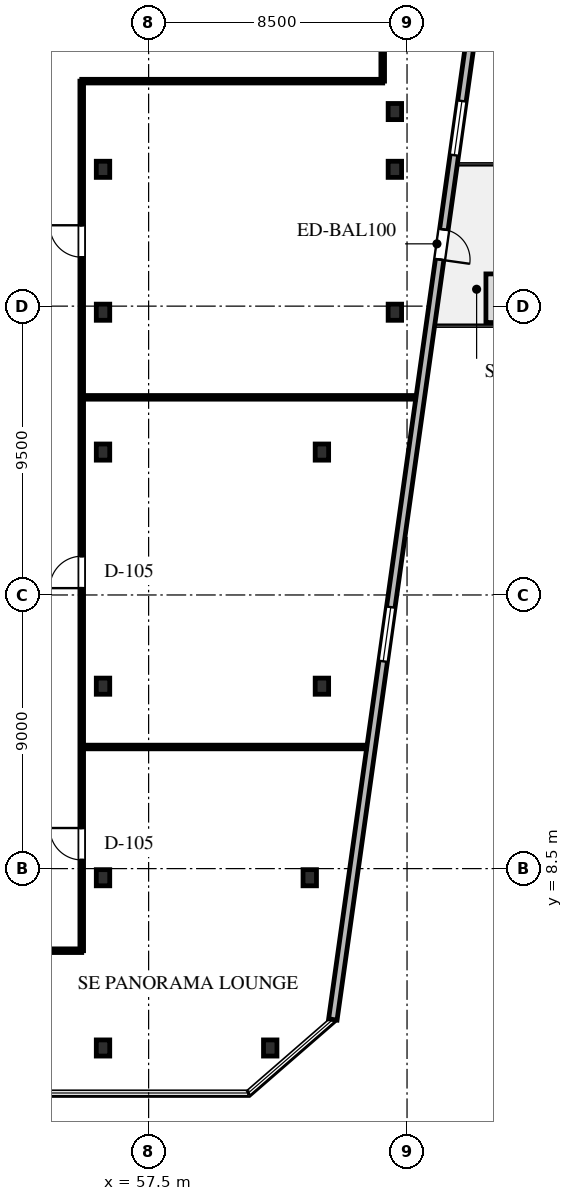
"""IFC4 building model, lengths in metres.
Left out: names, types, materials, properties, quantities, classifications, styles, units other than length and angle.
Written with IfcOpenShell. Run it as: python <this file> out.ifc"""

import sys

from ifc_helpers import new_model, si_unit, direction, frame, frame_2d, origin, origin_2d, place, context, subcontext, project, spatial, rectangle, i_section, extrude, element, fill, save


model = new_model("IFC4")
c1 = context("Model", 3, precision=1e-05, world=origin(), true_north=direction((0.0, 1.0)))
c2 = subcontext(c1, "Body", "Model", "MODEL_VIEW")
j1 = project(units=[si_unit("LENGTHUNIT", "METRE"), si_unit("PLANEANGLEUNIT", "RADIAN")], contexts=[c1])
p1 = place(None, origin())
s1 = spatial("IfcSite", under=j1, at=p1, CompositionType="ELEMENT")
p2 = place(p1, origin())
s2 = spatial("IfcBuilding", under=s1, at=p2, CompositionType="ELEMENT")
p3 = place(p2, frame((0.0, 0.0, 45.5)))
s3 = spatial("IfcBuildingStorey", under=s2, at=p3, CompositionType="ELEMENT", Elevation=45.5)
for number, where, z_axis, x_axis in (
    (1, (56.0, 14.5, 0.0), (0.0, 0.0, 1.0), (1.0, 0.0, 0.0)),
    (2, (63.2, 14.5, 0.0), (0.0, 0.0, 1.0), (1.0, 0.0, 0.0)),
    (3, (56.0, 22.2, 0.0), (0.0, 0.0, 1.0), (1.0, 0.0, 0.0)),
    (4, (63.2, 22.2, 0.0), (0.0, 0.0, 1.0), (1.0, 0.0, 0.0)),
    (5, (56.0, 26.8, 0.0), (0.0, 0.0, 1.0), (1.0, 0.0, 0.0)),
    (6, (65.6, 26.8, 0.0), (0.0, 0.0, 1.0), (1.0, 0.0, 0.0)),
    (7, (56.0, 31.5, 0.0), (0.0, 0.0, 1.0), (1.0, 0.0, 0.0)),
    (8, (65.6, 31.5, 0.0), (0.0, 0.0, 1.0), (1.0, 0.0, 0.0)),
    (9, (56.0, 2.6, 0.0), (0.0, 0.0, 1.0), (1.0, 0.0, 0.0)),
    (10, (61.5, 2.6, 0.0), (0.0, 0.0, 1.0), (1.0, 0.0, 0.0)),
    (11, (56.0, 8.2, 0.0), (0.0, 0.0, 1.0), (1.0, 0.0, 0.0)),
    (12, (62.8, 8.2, 0.0), (0.0, 0.0, 1.0), (1.0, 0.0, 0.0)),
    (13, (65.6, 33.4, 0.0), (0.0, 0.0, 1.0), (1.0, 0.0, 0.0)),
):
    element("IfcColumn", number, at=place(p3, frame(where, z_axis=z_axis, x_axis=x_axis)), inside=s3, PredefinedType="COLUMN", context=c2, shape_type="SweptSolid", body=[
        extrude(i_section(OverallWidth=0.442, OverallDepth=0.531, WebThickness=0.066, FlangeThickness=0.106, FilletRadius=0.03, at=origin_2d()), origin(), (0.0, 0.0, 1.0), 4.0),
    ])
p4 = place(p3, frame((68.375, 37.8, 0.0), z_axis=(0.0, 0.0, 1.0), x_axis=(-0.139174610616, -0.990267856572, 0.0)))
e14 = element("IfcWall", 14, at=p4, inside=s3, PredefinedType="STANDARD", context=c2, shape_type="SweptSolid", body=[
    extrude(rectangle(XDim=34.6, YDim=0.28, at=frame_2d((17.3, 0.0))), origin(), (0.0, 0.0, 1.0), 3.74),
])
p5 = place(p4, frame((8.36, 0.0, 0.0)))
e15 = element("IfcOpeningElement", 15, at=p5, cuts=e14, PredefinedType="OPENING", context=c2, shape_type="SweptSolid", body=[
    extrude(rectangle(XDim=1.0, YDim=2.15, at=frame_2d((0.5, 1.075))), frame((0.0, 0.15, 0.0), z_axis=(0.0, -1.0, 0.0), x_axis=(1.0, 0.0, 0.0)), (0.0, 0.0, 1.0), 0.3),
])
p6 = place(p4, frame((4.092, 0.0, 0.65)))
e16 = element("IfcOpeningElement", 16, at=p6, cuts=e14, PredefinedType="OPENING", context=c2, shape_type="SweptSolid", body=[
    extrude(rectangle(XDim=1.8, YDim=2.1, at=frame_2d((0.9, 1.05))), frame((0.0, 0.15, 0.0), z_axis=(0.0, -1.0, 0.0), x_axis=(1.0, 0.0, 0.0)), (0.0, 0.0, 1.0), 0.3),
])
p7 = place(p4, frame((20.903, 0.0, 0.65)))
e17 = element("IfcOpeningElement", 17, at=p7, cuts=e14, PredefinedType="OPENING", context=c2, shape_type="SweptSolid", body=[
    extrude(rectangle(XDim=1.8, YDim=2.1, at=frame_2d((0.9, 1.05))), frame((0.0, 0.15, 0.0), z_axis=(0.0, -1.0, 0.0), x_axis=(1.0, 0.0, 0.0)), (0.0, 0.0, 1.0), 0.3),
])
p8 = place(p3, frame((55.3, 34.4, 0.0), z_axis=(0.0, 0.0, 1.0), x_axis=(1.0, 0.0, 0.0)))
e18 = element("IfcWall", 18, at=p8, inside=s3, PredefinedType="PARTITIONING", context=c2, shape_type="SweptSolid", body=[
    extrude(rectangle(XDim=9.9, YDim=0.12, at=frame_2d((4.95, 0.0))), origin(), (0.0, 0.0, 1.0), 2.813),
])
p9 = place(p3, frame((65.2, 34.4, 0.0), z_axis=(0.0, 0.0, 1.0), x_axis=(0.0, 1.0, 0.0)))
e19 = element("IfcWall", 19, at=p9, inside=s3, PredefinedType="PARTITIONING", context=c2, shape_type="SweptSolid", body=[
    extrude(rectangle(XDim=3.217, YDim=0.12, at=frame_2d((1.608, 0.0))), origin(), (0.0, 0.0, 1.0), 2.813),
])
p10 = place(p3, frame((55.3, 5.8, 0.0), z_axis=(0.0, 0.0, 1.0), x_axis=(0.0, 1.0, 0.0)))
e20 = element("IfcWall", 20, at=p10, inside=s3, PredefinedType="PARTITIONING", context=c2, shape_type="SweptSolid", body=[
    extrude(rectangle(XDim=28.6, YDim=0.12, at=frame_2d((14.3, 0.0))), origin(), (0.0, 0.0, 1.0), 2.813),
])
p11 = place(p10, frame((2.985, 0.0, 0.0)))
e21 = element("IfcOpeningElement", 21, at=p11, cuts=e20, PredefinedType="OPENING", context=c2, shape_type="SweptSolid", body=[
    extrude(rectangle(XDim=1.05, YDim=2.2, at=frame_2d((0.525, 1.1))), frame((0.0, 0.07, 0.0), z_axis=(0.0, -1.0, 0.0), x_axis=(1.0, 0.0, 0.0)), (0.0, 0.0, 1.0), 0.14),
])
p12 = place(p10, frame((11.925, 0.0, 0.0)))
e22 = element("IfcOpeningElement", 22, at=p12, cuts=e20, PredefinedType="OPENING", context=c2, shape_type="SweptSolid", body=[
    extrude(rectangle(XDim=1.05, YDim=2.2, at=frame_2d((0.525, 1.1))), frame((0.0, 0.07, 0.0), z_axis=(0.0, -1.0, 0.0), x_axis=(1.0, 0.0, 0.0)), (0.0, 0.0, 1.0), 0.14),
])
p13 = place(p10, frame((22.81, 0.0, 0.0)))
e23 = element("IfcOpeningElement", 23, at=p13, cuts=e20, PredefinedType="OPENING", context=c2, shape_type="SweptSolid", body=[
    extrude(rectangle(XDim=1.05, YDim=2.2, at=frame_2d((0.525, 1.1))), frame((0.0, 0.07, 0.0), z_axis=(0.0, -1.0, 0.0), x_axis=(1.0, 0.0, 0.0)), (0.0, 0.0, 1.0), 0.14),
])
p14 = place(p3, frame((53.3, 5.8, 0.0), z_axis=(0.0, 0.0, 1.0), x_axis=(1.0, 0.0, 0.0)))
e24 = element("IfcWall", 24, at=p14, inside=s3, PredefinedType="PARTITIONING", context=c2, shape_type="SweptSolid", body=[
    extrude(rectangle(XDim=2.0, YDim=0.12, at=frame_2d((1.0, 0.0))), origin(), (0.0, 0.0, 1.0), 2.978),
])
p15 = place(p3, frame((55.368, 12.5, 0.0), z_axis=(0.0, 0.0, 1.0), x_axis=(1.0, 0.0, 0.0)))
e25 = element("IfcWall", 25, at=p15, inside=s3, PredefinedType="PARTITIONING", context=c2, shape_type="SweptSolid", body=[
    extrude(rectangle(XDim=9.285, YDim=0.12, at=frame_2d((4.642, 0.0))), origin(), (0.0, 0.0, 1.0), 2.813),
])
p16 = place(p3, frame((55.368, 24.0, 0.0), z_axis=(0.0, 0.0, 1.0), x_axis=(1.0, 0.0, 0.0)))
e26 = element("IfcWall", 26, at=p16, inside=s3, PredefinedType="PARTITIONING", context=c2, shape_type="SweptSolid", body=[
    extrude(rectangle(XDim=10.901, YDim=0.12, at=frame_2d((5.451, 0.0))), origin(), (0.0, 0.0, 1.0), 2.813),
])
p17 = place(p5, origin())
e27 = element("IfcDoor", 27, at=p17, inside=s3, OperationType="SINGLE_SWING_RIGHT", PredefinedType="DOOR", context=c2, shape_type="SweptSolid", body=[
    extrude(rectangle(XDim=1.0, YDim=2.15, at=frame_2d((0.5, 1.075))), frame((0.0, 0.025, 0.0), z_axis=(0.0, -1.0, 0.0), x_axis=(1.0, 0.0, 0.0)), (0.0, 0.0, 1.0), 0.05),
])
fill(e15, e27)
p18 = place(p6, origin())
e28 = element("IfcWindow", 28, at=p18, inside=s3, PartitioningType="SINGLE_PANEL", PredefinedType="WINDOW", context=c2, shape_type="SweptSolid", body=[
    extrude(rectangle(XDim=1.8, YDim=2.1, at=frame_2d((0.9, 1.05))), frame((0.0, 0.03, 0.0), z_axis=(0.0, -1.0, 0.0), x_axis=(1.0, 0.0, 0.0)), (0.0, 0.0, 1.0), 0.06),
])
fill(e16, e28)
p19 = place(p7, origin())
e29 = element("IfcWindow", 29, at=p19, inside=s3, PartitioningType="SINGLE_PANEL", PredefinedType="WINDOW", context=c2, shape_type="SweptSolid", body=[
    extrude(rectangle(XDim=1.8, YDim=2.1, at=frame_2d((0.9, 1.05))), frame((0.0, 0.03, 0.0), z_axis=(0.0, -1.0, 0.0), x_axis=(1.0, 0.0, 0.0)), (0.0, 0.0, 1.0), 0.06),
])
fill(e17, e29)
p20 = place(p11, origin())
e30 = element("IfcDoor", 30, at=p20, inside=s3, OperationType="SINGLE_SWING_RIGHT", PredefinedType="DOOR", context=c2, shape_type="SweptSolid", body=[
    extrude(rectangle(XDim=1.05, YDim=2.2, at=frame_2d((0.525, 1.1))), frame((0.0, 0.025, 0.0), z_axis=(0.0, -1.0, 0.0), x_axis=(1.0, 0.0, 0.0)), (0.0, 0.0, 1.0), 0.05),
])
fill(e21, e30)
p21 = place(p12, origin())
e31 = element("IfcDoor", 31, at=p21, inside=s3, OperationType="SINGLE_SWING_LEFT", PredefinedType="DOOR", context=c2, shape_type="SweptSolid", body=[
    extrude(rectangle(XDim=1.05, YDim=2.2, at=frame_2d((0.525, 1.1))), frame((0.0, 0.025, 0.0), z_axis=(0.0, -1.0, 0.0), x_axis=(1.0, 0.0, 0.0)), (0.0, 0.0, 1.0), 0.05),
])
fill(e22, e31)
p22 = place(p13, origin())
e32 = element("IfcDoor", 32, at=p22, inside=s3, OperationType="SINGLE_SWING_RIGHT", PredefinedType="DOOR", context=c2, shape_type="SweptSolid", body=[
    extrude(rectangle(XDim=1.05, YDim=2.2, at=frame_2d((0.525, 1.1))), frame((0.0, 0.025, 0.0), z_axis=(0.0, -1.0, 0.0), x_axis=(1.0, 0.0, 0.0)), (0.0, 0.0, 1.0), 0.05),
])
fill(e23, e32)
save(model, sys.argv[1])
